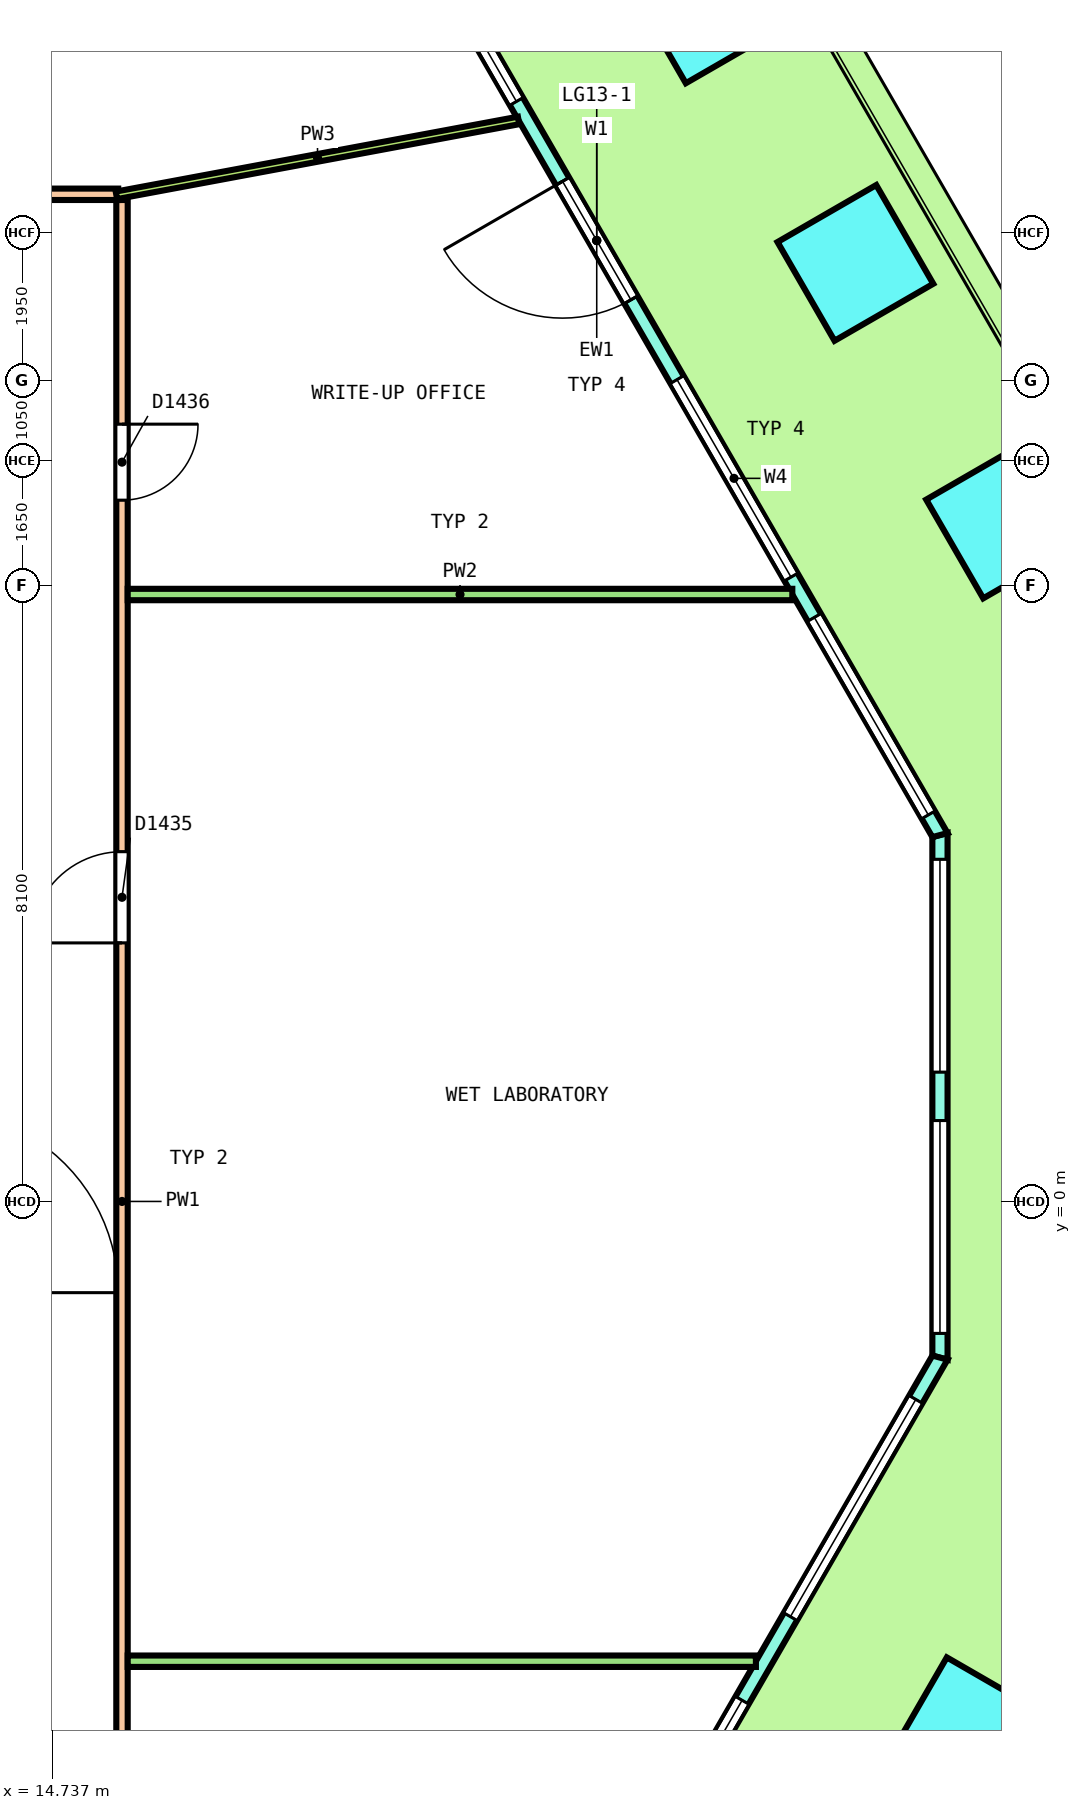
"""IFC4 building model, lengths in metres.
Left out: names, types, materials, properties, quantities, classifications, styles, units other than length and angle.
Written with IfcOpenShell. Run it as: python <this file> out.ifc"""

import sys

from ifc_helpers import new_model, si_unit, direction, frame, frame_2d, origin, origin_2d, place, context, subcontext, project, spatial, polyline, rectangle, outline, extrude, element, fill, save


model = new_model("IFC4")
c1 = context("Model", 3, precision=1e-05, world=origin(), true_north=direction((0.0, 1.0)))
c2 = subcontext(c1, "Body", "Model", "MODEL_VIEW")
j1 = project(units=[si_unit("LENGTHUNIT", "METRE"), si_unit("PLANEANGLEUNIT", "RADIAN")], contexts=[c1])
p1 = place(None, origin())
s1 = spatial("IfcSite", under=j1, at=p1, CompositionType="ELEMENT")
p2 = place(p1, origin())
s2 = spatial("IfcBuilding", under=s1, at=p2, CompositionType="ELEMENT")
p3 = place(p2, frame((0.0, 0.0, 58.6)))
s3 = spatial("IfcBuildingStorey", under=s2, at=p3, CompositionType="ELEMENT", Elevation=58.6)
for number, where, z_axis, x_axis in (
    (1, (27.255, 8.959, 0.0), (0.0, 0.0, 1.0), (-0.5, 0.866, 0.0)),
    (2, (25.299, 12.347, 0.0), (0.0, 0.0, 1.0), (-0.5, 0.866, 0.0)),
    (3, (23.342, 15.736, 0.0), (0.0, 0.0, 1.0), (-0.5, 0.866, 0.0)),
    (4, (26.776, -7.023, 0.0), (0.0, 0.0, 1.0), (0.5, 0.866, 0.0)),
):
    element("IfcColumn", number, at=place(p3, frame(where, z_axis=z_axis, x_axis=x_axis)), inside=s3, PredefinedType="COLUMN", context=c2, shape_type="SweptSolid", body=[
        extrude(rectangle(XDim=1.5, YDim=1.5, at=origin_2d()), origin(), (0.0, 0.0, 1.0), 4.05),
    ])
p4 = place(p3, frame((26.411, -2.055, 0.0), z_axis=(0.0, 0.0, 1.0), x_axis=(0.0, 1.0, 0.0)))
e5 = element("IfcWall", 5, at=p4, inside=s3, PredefinedType="SOLIDWALL", context=c2, shape_type="SweptSolid", body=[
    extrude(outline(polyline([(-0.027, -0.1), (1.128, -0.1), (2.283, -0.1), (3.438, -0.1), (4.592, -0.1), (5.747, -0.1), (6.902, -0.1), (6.848, 0.1), (5.711, 0.1), (4.574, 0.1), (3.438, 0.1), (2.301, 0.1), (1.164, 0.1), (0.027, 0.1), (-0.027, -0.1)])), origin(), (0.0, 0.0, 1.0), 4.1),
])
p5 = place(p4, frame((0.319, 0.0, 0.1)))
e6 = element("IfcOpeningElement", 6, at=p5, cuts=e5, PredefinedType="OPENING", context=c2, shape_type="SweptSolid", body=[
    extrude(rectangle(XDim=2.8, YDim=2.9, at=frame_2d((1.4, 1.45))), frame((0.0, 0.11, 0.0), z_axis=(0.0, -1.0, 0.0), x_axis=(1.0, 0.0, 0.0)), (0.0, 0.0, 1.0), 0.22),
])
p6 = place(p4, frame((3.756, 0.0, 0.1)))
e7 = element("IfcOpeningElement", 7, at=p6, cuts=e5, PredefinedType="OPENING", context=c2, shape_type="SweptSolid", body=[
    extrude(rectangle(XDim=2.8, YDim=2.9, at=frame_2d((1.4, 1.45))), frame((0.0, 0.11, 0.0), z_axis=(0.0, -1.0, 0.0), x_axis=(1.0, 0.0, 0.0)), (0.0, 0.0, 1.0), 0.22),
])
p7 = place(p3, frame((26.411, 4.82, 0.0), z_axis=(0.0, 0.0, 1.0), x_axis=(-0.500000137386, 0.866025324465, 0.0)))
e8 = element("IfcWall", 8, at=p7, inside=s3, PredefinedType="SOLIDWALL", context=c2, shape_type="SweptSolid", body=[
    extrude(outline(polyline([(-0.027, -0.1), (0.979, -0.1), (1.986, -0.1), (2.992, -0.1), (3.999, -0.1), (5.005, -0.1), (6.012, -0.1), (7.018, -0.1), (8.025, -0.1), (9.031, -0.1), (10.038, -0.1), (11.044, -0.1), (12.051, -0.1), (13.057, -0.1), (14.063, -0.1), (15.07, -0.1), (16.076, -0.1), (17.083, -0.1), (18.089, -0.1), (18.036, 0.1), (17.035, 0.1), (16.035, 0.1), (15.034, 0.1), (14.034, 0.1), (13.033, 0.1), (12.033, 0.1), (11.032, 0.1), (10.032, 0.1), (9.031, 0.1), (8.031, 0.1), (7.03, 0.1), (6.03, 0.1), (5.029, 0.1), (4.029, 0.1), (3.028, 0.1), (2.028, 0.1), (1.027, 0.1), (0.027, 0.1), (-0.027, -0.1)])), origin(), (0.0, 0.0, 1.0), 4.1),
])
p8 = place(p7, frame((0.306, 0.0, 0.1)))
e9 = element("IfcOpeningElement", 9, at=p8, cuts=e8, PredefinedType="OPENING", context=c2, shape_type="SweptSolid", body=[
    extrude(rectangle(XDim=3.0, YDim=2.9, at=frame_2d((1.5, 1.45))), frame((0.0, 0.11, 0.0), z_axis=(0.0, -1.0, 0.0), x_axis=(1.0, 0.0, 0.0)), (0.0, 0.0, 1.0), 0.22),
])
p9 = place(p7, frame((3.919, 0.0, 0.1)))
e10 = element("IfcOpeningElement", 10, at=p9, cuts=e8, PredefinedType="OPENING", context=c2, shape_type="SweptSolid", body=[
    extrude(rectangle(XDim=3.0, YDim=2.9, at=frame_2d((1.5, 1.45))), frame((0.0, 0.11, 0.0), z_axis=(0.0, -1.0, 0.0), x_axis=(1.0, 0.0, 0.0)), (0.0, 0.0, 1.0), 0.22),
])
p10 = place(p7, frame((8.131, 0.0, 0.0)))
e11 = element("IfcOpeningElement", 11, at=p10, cuts=e8, PredefinedType="OPENING", context=c2, shape_type="SweptSolid", body=[
    extrude(rectangle(XDim=1.8, YDim=2.4, at=frame_2d((0.9, 1.2))), frame((0.0, 0.11, 0.0), z_axis=(0.0, -1.0, 0.0), x_axis=(1.0, 0.0, 0.0)), (0.0, 0.0, 1.0), 0.22),
])
p11 = place(p7, frame((8.131, 0.0, 2.55)))
e12 = element("IfcOpeningElement", 12, at=p11, cuts=e8, PredefinedType="OPENING", context=c2, shape_type="SweptSolid", body=[
    extrude(rectangle(XDim=1.8, YDim=0.45, at=frame_2d((0.9, 0.225))), frame((0.0, 0.11, 0.0), z_axis=(0.0, -1.0, 0.0), x_axis=(1.0, 0.0, 0.0)), (0.0, 0.0, 1.0), 0.22),
])
p12 = place(p7, frame((11.144, 0.0, 0.1)))
e13 = element("IfcOpeningElement", 13, at=p12, cuts=e8, PredefinedType="OPENING", context=c2, shape_type="SweptSolid", body=[
    extrude(rectangle(XDim=3.0, YDim=2.9, at=frame_2d((1.5, 1.45))), frame((0.0, 0.11, 0.0), z_axis=(0.0, -1.0, 0.0), x_axis=(1.0, 0.0, 0.0)), (0.0, 0.0, 1.0), 0.22),
])
p13 = place(p7, frame((14.756, 0.0, 0.1)))
e14 = element("IfcOpeningElement", 14, at=p13, cuts=e8, PredefinedType="OPENING", context=c2, shape_type="SweptSolid", body=[
    extrude(rectangle(XDim=3.0, YDim=2.9, at=frame_2d((1.5, 1.45))), frame((0.0, 0.11, 0.0), z_axis=(0.0, -1.0, 0.0), x_axis=(1.0, 0.0, 0.0)), (0.0, 0.0, 1.0), 0.22),
])
p14 = place(p3, frame((14.985, -21.845, 0.0), z_axis=(0.0, 0.0, 1.0), x_axis=(0.50000204422, 0.86602422355, 0.0)))
e15 = element("IfcWall", 15, at=p14, inside=s3, PredefinedType="SOLIDWALL", context=c2, shape_type="SweptSolid", body=[
    extrude(outline(polyline([(-0.027, -0.1), (1.014, -0.1), (2.055, -0.1), (3.097, -0.1), (4.138, -0.1), (5.179, -0.1), (6.22, -0.1), (7.261, -0.1), (8.303, -0.1), (9.344, -0.1), (10.385, -0.1), (11.426, -0.1), (12.468, -0.1), (13.509, -0.1), (14.55, -0.1), (15.591, -0.1), (16.632, -0.1), (17.673, -0.1), (18.715, -0.1), (19.756, -0.1), (20.797, -0.1), (21.838, -0.1), (22.879, -0.1), (22.826, 0.1), (21.789, 0.1), (20.753, 0.1), (19.717, 0.1), (18.68, 0.1), (17.644, 0.1), (16.608, 0.1), (15.572, 0.1), (14.535, 0.1), (13.499, 0.1), (12.463, 0.1), (11.426, 0.1), (10.39, 0.1), (9.354, 0.1), (8.317, 0.1), (7.281, 0.1), (6.245, 0.1), (5.208, 0.1), (4.172, 0.1), (3.136, 0.1), (2.099, 0.1), (1.063, 0.1), (0.027, 0.1), (-0.027, -0.1)])), origin(), (0.0, 0.0, 1.0), 4.1),
])
p15 = place(p14, frame((0.635, 0.0, 0.1)))
e16 = element("IfcOpeningElement", 16, at=p15, cuts=e15, PredefinedType="OPENING", context=c2, shape_type="SweptSolid", body=[
    extrude(rectangle(XDim=3.3, YDim=2.9, at=frame_2d((1.65, 1.45))), frame((0.0, 0.11, 0.0), z_axis=(0.0, -1.0, 0.0), x_axis=(1.0, 0.0, 0.0)), (0.0, 0.0, 1.0), 0.22),
])
p16 = place(p14, frame((5.206, 0.0, 0.1)))
e17 = element("IfcOpeningElement", 17, at=p16, cuts=e15, PredefinedType="OPENING", context=c2, shape_type="SweptSolid", body=[
    extrude(rectangle(XDim=3.3, YDim=2.9, at=frame_2d((1.65, 1.45))), frame((0.0, 0.11, 0.0), z_axis=(0.0, -1.0, 0.0), x_axis=(1.0, 0.0, 0.0)), (0.0, 0.0, 1.0), 0.22),
])
p17 = place(p14, frame((10.526, 0.0, 0.0)))
e18 = element("IfcOpeningElement", 18, at=p17, cuts=e15, PredefinedType="OPENING", context=c2, shape_type="SweptSolid", body=[
    extrude(rectangle(XDim=1.8, YDim=2.4, at=frame_2d((0.9, 1.2))), frame((0.0, 0.11, 0.0), z_axis=(0.0, -1.0, 0.0), x_axis=(1.0, 0.0, 0.0)), (0.0, 0.0, 1.0), 0.22),
])
p18 = place(p14, frame((10.526, 0.0, 2.55)))
e19 = element("IfcOpeningElement", 19, at=p18, cuts=e15, PredefinedType="OPENING", context=c2, shape_type="SweptSolid", body=[
    extrude(rectangle(XDim=1.8, YDim=0.45, at=frame_2d((0.9, 0.225))), frame((0.0, 0.11, 0.0), z_axis=(0.0, -1.0, 0.0), x_axis=(1.0, 0.0, 0.0)), (0.0, 0.0, 1.0), 0.22),
])
p19 = place(p14, frame((14.347, 0.0, 0.1)))
e20 = element("IfcOpeningElement", 20, at=p19, cuts=e15, PredefinedType="OPENING", context=c2, shape_type="SweptSolid", body=[
    extrude(rectangle(XDim=3.3, YDim=2.9, at=frame_2d((1.65, 1.45))), frame((0.0, 0.11, 0.0), z_axis=(0.0, -1.0, 0.0), x_axis=(1.0, 0.0, 0.0)), (0.0, 0.0, 1.0), 0.22),
])
p20 = place(p14, frame((18.917, 0.0, 0.1)))
e21 = element("IfcOpeningElement", 21, at=p20, cuts=e15, PredefinedType="OPENING", context=c2, shape_type="SweptSolid", body=[
    extrude(rectangle(XDim=3.3, YDim=2.9, at=frame_2d((1.65, 1.45))), frame((0.0, 0.11, 0.0), z_axis=(0.0, -1.0, 0.0), x_axis=(1.0, 0.0, 0.0)), (0.0, 0.0, 1.0), 0.22),
])
p21 = place(p3, frame((15.65, -13.175, 0.0), z_axis=(0.0, 0.0, 1.0), x_axis=(0.0, 1.0, 0.0)))
e22 = element("IfcWall", 22, at=p21, inside=s3, PredefinedType="PARTITIONING", context=c2, shape_type="SweptSolid", body=[
    extrude(rectangle(XDim=26.35, YDim=0.15, at=frame_2d((13.175, 0.0))), origin(), (0.0, 0.0, 1.0), 3.05),
])
p22 = place(p21, frame((16.576, 0.0, 0.0)))
e23 = element("IfcOpeningElement", 23, at=p22, cuts=e22, PredefinedType="OPENING", context=c2, shape_type="SweptSolid", body=[
    extrude(rectangle(XDim=1.2, YDim=2.1, at=frame_2d((0.6, 1.05))), frame((0.0, 0.085, 0.0), z_axis=(0.0, -1.0, 0.0), x_axis=(1.0, 0.0, 0.0)), (0.0, 0.0, 1.0), 0.17),
])
p23 = place(p21, frame((22.401, 0.0, 0.0)))
e24 = element("IfcOpeningElement", 24, at=p23, cuts=e22, PredefinedType="OPENING", context=c2, shape_type="SweptSolid", body=[
    extrude(rectangle(XDim=1.0, YDim=2.1, at=frame_2d((0.5, 1.05))), frame((0.0, 0.085, 0.0), z_axis=(0.0, -1.0, 0.0), x_axis=(1.0, 0.0, 0.0)), (0.0, 0.0, 1.0), 0.17),
])
p24 = place(p21, frame((1.65, 0.0, 0.0)))
e25 = element("IfcOpeningElement", 25, at=p24, cuts=e22, PredefinedType="OPENING", context=c2, shape_type="SweptSolid", body=[
    extrude(rectangle(XDim=1.0, YDim=2.1, at=frame_2d((0.5, 1.05))), frame((0.0, 0.085, 0.0), z_axis=(0.0, -1.0, 0.0), x_axis=(1.0, 0.0, 0.0)), (0.0, 0.0, 1.0), 0.17),
])
p25 = place(p3, frame((-15.575, 13.25, 0.0), z_axis=(0.0, 0.0, 1.0), x_axis=(1.0, 0.0, 0.0)))
e26 = element("IfcWall", 26, at=p25, inside=s3, PredefinedType="PARTITIONING", context=c2, shape_type="SweptSolid", body=[
    extrude(rectangle(XDim=31.175, YDim=0.15, at=frame_2d((15.587, 0.0))), origin(), (0.0, 0.0, 1.0), 3.05),
])
p26 = place(p25, frame((28.252, 0.0, 0.0)))
e27 = element("IfcOpeningElement", 27, at=p26, cuts=e26, PredefinedType="OPENING", context=c2, shape_type="SweptSolid", body=[
    extrude(rectangle(XDim=1.0, YDim=2.1, at=frame_2d((0.5, 1.05))), frame((0.0, 0.085, 0.0), z_axis=(0.0, -1.0, 0.0), x_axis=(1.0, 0.0, 0.0)), (0.0, 0.0, 1.0), 0.17),
])
p27 = place(p25, frame((14.802, 0.0, 0.0)))
e28 = element("IfcOpeningElement", 28, at=p27, cuts=e26, PredefinedType="OPENING", context=c2, shape_type="SweptSolid", body=[
    extrude(rectangle(XDim=1.2, YDim=2.1, at=frame_2d((0.6, 1.05))), frame((0.0, 0.085, 0.0), z_axis=(0.0, -1.0, 0.0), x_axis=(1.0, 0.0, 0.0)), (0.0, 0.0, 1.0), 0.17),
])
p28 = place(p25, frame((5.812, 0.0, 0.0)))
e29 = element("IfcOpeningElement", 29, at=p28, cuts=e26, PredefinedType="OPENING", context=c2, shape_type="SweptSolid", body=[
    extrude(rectangle(XDim=1.2, YDim=2.1, at=frame_2d((0.6, 1.05))), frame((0.0, 0.085, 0.0), z_axis=(0.0, -1.0, 0.0), x_axis=(1.0, 0.0, 0.0)), (0.0, 0.0, 1.0), 0.17),
])
p29 = place(p25, frame((0.849, 0.0, 0.0)))
e30 = element("IfcOpeningElement", 30, at=p29, cuts=e26, PredefinedType="OPENING", context=c2, shape_type="SweptSolid", body=[
    extrude(rectangle(XDim=1.2, YDim=2.1, at=frame_2d((0.6, 1.05))), frame((0.0, 0.085, 0.0), z_axis=(0.0, -1.0, 0.0), x_axis=(1.0, 0.0, 0.0)), (0.0, 0.0, 1.0), 0.17),
])
p30 = place(p3, frame((15.725, 7.985, 0.0), z_axis=(0.0, 0.0, 1.0), x_axis=(1.0, 0.0, 0.0)))
e31 = element("IfcWall", 31, at=p30, inside=s3, PredefinedType="PARTITIONING", context=c2, shape_type="SweptSolid", body=[
    extrude(rectangle(XDim=8.743, YDim=0.15, at=frame_2d((4.372, 0.0))), origin(), (0.0, 0.0, 1.0), 3.05),
])
p31 = place(p3, frame((15.725, -6.049, 0.0), z_axis=(0.0, 0.0, 1.0), x_axis=(1.0, 0.0, 0.0)))
e32 = element("IfcWall", 32, at=p31, inside=s3, PredefinedType="PARTITIONING", context=c2, shape_type="SweptSolid", body=[
    extrude(rectangle(XDim=8.264, YDim=0.15, at=frame_2d((4.132, 0.0))), origin(), (0.0, 0.0, 1.0), 3.05),
])
p32 = place(p3, frame((15.576, 13.236, 0.0), z_axis=(0.0, 0.0, 1.0), x_axis=(0.983108608108, 0.183023126037, 0.0)))
e33 = element("IfcWall", 33, at=p32, inside=s3, PredefinedType="PARTITIONING", context=c2, shape_type="SweptSolid", body=[
    extrude(rectangle(XDim=5.382, YDim=0.1, at=frame_2d((2.691, 0.0))), origin(), (0.0, 0.0, 1.0), 3.05),
])
p33 = place(p5, origin())
e34 = element("IfcWindow", 34, at=p33, inside=s3, PartitioningType="SINGLE_PANEL", PredefinedType="WINDOW", context=c2, shape_type="SweptSolid", body=[
    extrude(rectangle(XDim=2.8, YDim=2.9, at=frame_2d((1.4, 1.45))), frame((0.0, 0.03, 0.0), z_axis=(0.0, -1.0, 0.0), x_axis=(1.0, 0.0, 0.0)), (0.0, 0.0, 1.0), 0.06),
])
fill(e6, e34)
p34 = place(p6, origin())
e35 = element("IfcWindow", 35, at=p34, inside=s3, PartitioningType="SINGLE_PANEL", PredefinedType="WINDOW", context=c2, shape_type="SweptSolid", body=[
    extrude(rectangle(XDim=2.8, YDim=2.9, at=frame_2d((1.4, 1.45))), frame((0.0, 0.03, 0.0), z_axis=(0.0, -1.0, 0.0), x_axis=(1.0, 0.0, 0.0)), (0.0, 0.0, 1.0), 0.06),
])
fill(e7, e35)
p35 = place(p8, origin())
e36 = element("IfcWindow", 36, at=p35, inside=s3, PartitioningType="SINGLE_PANEL", PredefinedType="WINDOW", context=c2, shape_type="SweptSolid", body=[
    extrude(rectangle(XDim=3.0, YDim=2.9, at=frame_2d((1.5, 1.45))), frame((0.0, 0.03, 0.0), z_axis=(0.0, -1.0, 0.0), x_axis=(1.0, 0.0, 0.0)), (0.0, 0.0, 1.0), 0.06),
])
fill(e9, e36)
p36 = place(p9, origin())
e37 = element("IfcWindow", 37, at=p36, inside=s3, PartitioningType="SINGLE_PANEL", PredefinedType="WINDOW", context=c2, shape_type="SweptSolid", body=[
    extrude(rectangle(XDim=3.0, YDim=2.9, at=frame_2d((1.5, 1.45))), frame((0.0, 0.03, 0.0), z_axis=(0.0, -1.0, 0.0), x_axis=(1.0, 0.0, 0.0)), (0.0, 0.0, 1.0), 0.06),
])
fill(e10, e37)
p37 = place(p10, origin())
e38 = element("IfcDoor", 38, at=p37, inside=s3, OperationType="DOUBLE_DOOR_SINGLE_SWING", PredefinedType="DOOR", context=c2, shape_type="SweptSolid", body=[
    extrude(rectangle(XDim=1.8, YDim=2.4, at=frame_2d((0.9, 1.2))), frame((0.0, 0.025, 0.0), z_axis=(0.0, -1.0, 0.0), x_axis=(1.0, 0.0, 0.0)), (0.0, 0.0, 1.0), 0.05),
])
fill(e11, e38)
p38 = place(p11, origin())
e39 = element("IfcWindow", 39, at=p38, inside=s3, PartitioningType="SINGLE_PANEL", PredefinedType="WINDOW", context=c2, shape_type="SweptSolid", body=[
    extrude(rectangle(XDim=1.8, YDim=0.45, at=frame_2d((0.9, 0.225))), frame((0.0, 0.03, 0.0), z_axis=(0.0, -1.0, 0.0), x_axis=(1.0, 0.0, 0.0)), (0.0, 0.0, 1.0), 0.06),
])
fill(e12, e39)
p39 = place(p12, origin())
e40 = element("IfcWindow", 40, at=p39, inside=s3, PartitioningType="SINGLE_PANEL", PredefinedType="WINDOW", context=c2, shape_type="SweptSolid", body=[
    extrude(rectangle(XDim=3.0, YDim=2.9, at=frame_2d((1.5, 1.45))), frame((0.0, 0.03, 0.0), z_axis=(0.0, -1.0, 0.0), x_axis=(1.0, 0.0, 0.0)), (0.0, 0.0, 1.0), 0.06),
])
fill(e13, e40)
p40 = place(p19, origin())
e41 = element("IfcWindow", 41, at=p40, inside=s3, PartitioningType="SINGLE_PANEL", PredefinedType="WINDOW", context=c2, shape_type="SweptSolid", body=[
    extrude(rectangle(XDim=3.3, YDim=2.9, at=frame_2d((1.65, 1.45))), frame((0.0, 0.03, 0.0), z_axis=(0.0, -1.0, 0.0), x_axis=(1.0, 0.0, 0.0)), (0.0, 0.0, 1.0), 0.06),
])
fill(e20, e41)
p41 = place(p20, origin())
e42 = element("IfcWindow", 42, at=p41, inside=s3, PartitioningType="SINGLE_PANEL", PredefinedType="WINDOW", context=c2, shape_type="SweptSolid", body=[
    extrude(rectangle(XDim=3.3, YDim=2.9, at=frame_2d((1.65, 1.45))), frame((0.0, 0.03, 0.0), z_axis=(0.0, -1.0, 0.0), x_axis=(1.0, 0.0, 0.0)), (0.0, 0.0, 1.0), 0.06),
])
fill(e21, e42)
p42 = place(p22, origin())
e43 = element("IfcDoor", 43, at=p42, inside=s3, OperationType="DOUBLE_DOOR_SINGLE_SWING", PredefinedType="DOOR", context=c2, shape_type="SweptSolid", body=[
    extrude(rectangle(XDim=1.2, YDim=2.1, at=frame_2d((0.6, 1.05))), frame((0.0, 0.025, 0.0), z_axis=(0.0, -1.0, 0.0), x_axis=(1.0, 0.0, 0.0)), (0.0, 0.0, 1.0), 0.05),
])
fill(e23, e43)
p43 = place(p23, origin())
e44 = element("IfcDoor", 44, at=p43, inside=s3, OperationType="SINGLE_SWING_RIGHT", PredefinedType="DOOR", context=c2, shape_type="SweptSolid", body=[
    extrude(rectangle(XDim=1.0, YDim=2.1, at=frame_2d((0.5, 1.05))), frame((0.0, 0.025, 0.0), z_axis=(0.0, -1.0, 0.0), x_axis=(1.0, 0.0, 0.0)), (0.0, 0.0, 1.0), 0.05),
])
fill(e24, e44)
save(model, sys.argv[1])
